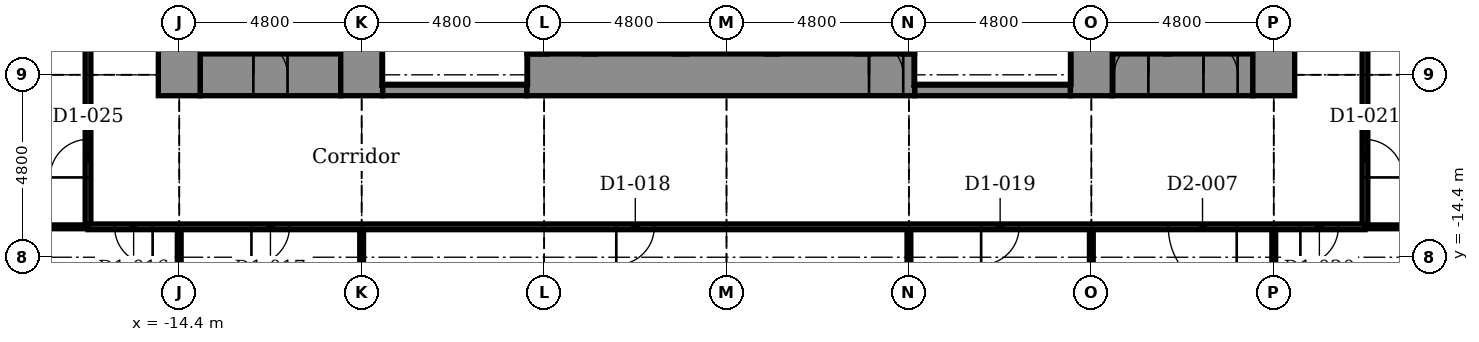
"""IFC4 building model, lengths in metres.
Left out: names, types, materials, properties, quantities, classifications, styles, units other than length and angle.
Written with IfcOpenShell. Run it as: python <this file> out.ifc"""

import sys

from ifc_helpers import new_model, si_unit, direction, frame, frame_2d, origin, place, context, subcontext, project, spatial, rectangle, extrude, element, fill, save


model = new_model("IFC4")
c1 = context("Model", 3, precision=1e-05, world=origin(), true_north=direction((0.0, 1.0)))
c2 = subcontext(c1, "Body", "Model", "MODEL_VIEW")
j1 = project(units=[si_unit("LENGTHUNIT", "METRE"), si_unit("PLANEANGLEUNIT", "RADIAN")], contexts=[c1])
p1 = place(None, origin())
s1 = spatial("IfcSite", under=j1, at=p1, CompositionType="ELEMENT")
p2 = place(p1, origin())
s2 = spatial("IfcBuilding", under=s1, at=p2, CompositionType="ELEMENT")
p3 = place(p2, frame((0.0, 0.0, 7.0)))
s3 = spatial("IfcBuildingStorey", under=s2, at=p3, CompositionType="ELEMENT", Elevation=7.0)
p4 = place(p3, frame((-9.05, -10.0, -0.3), z_axis=(0.0, 0.0, 1.0), x_axis=(1.0, 0.0, 0.0)))
e1 = element("IfcWall", 1, at=p4, inside=s3, PredefinedType="STANDARD", context=c2, shape_type="SweptSolid", body=[
    extrude(rectangle(XDim=3.8, YDim=0.3, at=frame_2d((1.9, 0.0))), origin(), (0.0, 0.0, 1.0), 5.4),
])
p5 = place(p3, frame((4.95, -10.0, -0.3), z_axis=(0.0, 0.0, 1.0), x_axis=(1.0, 0.0, 0.0)))
e2 = element("IfcWall", 2, at=p5, inside=s3, PredefinedType="STANDARD", context=c2, shape_type="SweptSolid", body=[
    extrude(rectangle(XDim=4.1, YDim=0.3, at=frame_2d((2.05, 0.0))), origin(), (0.0, 0.0, 1.0), 5.4),
])
p6 = place(p3, frame((-13.85, -9.6, -0.3), z_axis=(0.0, 0.0, 1.0), x_axis=(1.0, 0.0, 0.0)))
e3 = element("IfcWall", 3, at=p6, inside=s3, PredefinedType="SHEAR", context=c2, shape_type="SweptSolid", body=[
    extrude(rectangle(XDim=3.7, YDim=1.1, at=frame_2d((1.85, 0.0))), origin(), (0.0, 0.0, 1.0), 5.4),
])
p7 = place(p6, frame((1.4, 0.0, 0.3)))
e4 = element("IfcOpeningElement", 4, at=p7, cuts=e3, PredefinedType="OPENING", context=c2, shape_type="SweptSolid", body=[
    extrude(rectangle(XDim=0.9, YDim=2.1, at=frame_2d((0.45, 1.05))), frame((0.0, 0.56, 0.0), z_axis=(0.0, -1.0, 0.0), x_axis=(1.0, 0.0, 0.0)), (0.0, 0.0, 1.0), 1.12),
])
p8 = place(p3, frame((-5.25, -9.6, -0.3), z_axis=(0.0, 0.0, 1.0), x_axis=(1.0, 0.0, 0.0)))
e5 = element("IfcWall", 5, at=p8, inside=s3, PredefinedType="SHEAR", context=c2, shape_type="SweptSolid", body=[
    extrude(rectangle(XDim=10.2, YDim=1.1, at=frame_2d((5.1, 0.0))), origin(), (0.0, 0.0, 1.0), 5.4),
])
p9 = place(p8, frame((9.0, 0.0, 0.3)))
e6 = element("IfcOpeningElement", 6, at=p9, cuts=e5, PredefinedType="OPENING", context=c2, shape_type="SweptSolid", body=[
    extrude(rectangle(XDim=0.9, YDim=2.1, at=frame_2d((0.45, 1.05))), frame((0.0, 0.56, 0.0), z_axis=(0.0, -1.0, 0.0), x_axis=(1.0, 0.0, 0.0)), (0.0, 0.0, 1.0), 1.12),
])
p10 = place(p3, frame((10.15, -9.6, -0.3), z_axis=(0.0, 0.0, 1.0), x_axis=(1.0, 0.0, 0.0)))
e7 = element("IfcWall", 7, at=p10, inside=s3, PredefinedType="SHEAR", context=c2, shape_type="SweptSolid", body=[
    extrude(rectangle(XDim=3.7, YDim=1.1, at=frame_2d((1.85, 0.0))), origin(), (0.0, 0.0, 1.0), 5.4),
])
p11 = place(p10, frame((0.05, 0.0, 0.3)))
e8 = element("IfcOpeningElement", 8, at=p11, cuts=e7, PredefinedType="OPENING", context=c2, shape_type="SweptSolid", body=[
    extrude(rectangle(XDim=0.9, YDim=2.1, at=frame_2d((0.45, 1.05))), frame((0.0, 0.56, 0.0), z_axis=(0.0, -1.0, 0.0), x_axis=(1.0, 0.0, 0.0)), (0.0, 0.0, 1.0), 1.12),
])
p12 = place(p10, frame((2.4, 0.0, 0.3)))
e9 = element("IfcOpeningElement", 9, at=p12, cuts=e7, PredefinedType="OPENING", context=c2, shape_type="SweptSolid", body=[
    extrude(rectangle(XDim=0.9, YDim=2.1, at=frame_2d((0.45, 1.05))), frame((0.0, 0.56, 0.0), z_axis=(0.0, -1.0, 0.0), x_axis=(1.0, 0.0, 0.0)), (0.0, 0.0, 1.0), 1.12),
])
p13 = place(p3, frame((-14.4, -10.15, -0.3), z_axis=(0.0, 0.0, 1.0), x_axis=(0.0, 1.0, 0.0)))
e10 = element("IfcWall", 10, at=p13, inside=s3, PredefinedType="SHEAR", context=c2, shape_type="SweptSolid", body=[
    extrude(rectangle(XDim=20.3, YDim=1.1, at=frame_2d((10.15, 0.0))), origin(), (0.0, 0.0, 1.0), 5.4),
])
p14 = place(p13, frame((3.6, 0.0, 0.3)))
e11 = element("IfcOpeningElement", 11, at=p14, cuts=e10, PredefinedType="OPENING", context=c2, shape_type="SweptSolid", body=[
    extrude(rectangle(XDim=1.1, YDim=2.1, at=frame_2d((0.55, 1.05))), frame((0.0, 0.56, 0.0), z_axis=(0.0, -1.0, 0.0), x_axis=(1.0, 0.0, 0.0)), (0.0, 0.0, 1.0), 1.12),
])
p15 = place(p13, frame((6.0, 0.0, 0.3)))
e12 = element("IfcOpeningElement", 12, at=p15, cuts=e10, PredefinedType="OPENING", context=c2, shape_type="SweptSolid", body=[
    extrude(rectangle(XDim=1.1, YDim=2.1, at=frame_2d((0.55, 1.05))), frame((0.0, 0.56, 0.0), z_axis=(0.0, -1.0, 0.0), x_axis=(1.0, 0.0, 0.0)), (0.0, 0.0, 1.0), 1.12),
])
p16 = place(p13, frame((8.4, 0.0, 0.3)))
e13 = element("IfcOpeningElement", 13, at=p16, cuts=e10, PredefinedType="OPENING", context=c2, shape_type="SweptSolid", body=[
    extrude(rectangle(XDim=1.1, YDim=2.1, at=frame_2d((0.55, 1.05))), frame((0.0, 0.56, 0.0), z_axis=(0.0, -1.0, 0.0), x_axis=(1.0, 0.0, 0.0)), (0.0, 0.0, 1.0), 1.12),
])
p17 = place(p13, frame((10.8, 0.0, 0.3)))
e14 = element("IfcOpeningElement", 14, at=p17, cuts=e10, PredefinedType="OPENING", context=c2, shape_type="SweptSolid", body=[
    extrude(rectangle(XDim=1.1, YDim=2.1, at=frame_2d((0.55, 1.05))), frame((0.0, 0.56, 0.0), z_axis=(0.0, -1.0, 0.0), x_axis=(1.0, 0.0, 0.0)), (0.0, 0.0, 1.0), 1.12),
])
p18 = place(p3, frame((-9.6, -10.15, -0.3), z_axis=(0.0, 0.0, 1.0), x_axis=(0.0, 1.0, 0.0)))
e15 = element("IfcWall", 15, at=p18, inside=s3, PredefinedType="SHEAR", context=c2, shape_type="SweptSolid", body=[
    extrude(rectangle(XDim=7.6, YDim=1.1, at=frame_2d((3.8, 0.0))), origin(), (0.0, 0.0, 1.0), 5.4),
])
p19 = place(p3, frame((-5.1, -9.05, -0.3), z_axis=(0.0, 0.0, 1.0), x_axis=(0.0, 1.0, 0.0)))
e16 = element("IfcWall", 16, at=p19, inside=s3, PredefinedType="STANDARD", context=c2, shape_type="SweptSolid", body=[
    extrude(rectangle(XDim=6.8, YDim=0.3, at=frame_2d((3.4, 0.0))), origin(), (0.0, 0.0, 1.0), 5.4),
])
p20 = place(p19, frame((3.6, 0.0, 0.3)))
e17 = element("IfcOpeningElement", 17, at=p20, cuts=e16, PredefinedType="OPENING", context=c2, shape_type="SweptSolid", body=[
    extrude(rectangle(XDim=1.2, YDim=2.1, at=frame_2d((0.6, 1.05))), frame((0.0, 0.16, 0.0), z_axis=(0.0, -1.0, 0.0), x_axis=(1.0, 0.0, 0.0)), (0.0, 0.0, 1.0), 0.32),
])
for number, where, z_axis, x_axis in (
    (18, (-3.6, -9.05, -0.3), (0.0, 0.0, 1.0), (0.0, 1.0, 0.0)),
    (19, (-1.2, -9.05, -0.3), (0.0, 0.0, 1.0), (0.0, 1.0, 0.0)),
    (20, (1.2, -9.05, -0.3), (0.0, 0.0, 1.0), (0.0, 1.0, 0.0)),
    (21, (3.6, -9.05, -0.3), (0.0, 0.0, 1.0), (0.0, 1.0, 0.0)),
):
    element("IfcWall", number, at=place(p3, frame(where, z_axis=z_axis, x_axis=x_axis)), inside=s3, PredefinedType="STANDARD", context=c2, shape_type="SweptSolid", body=[
        extrude(rectangle(XDim=3.2, YDim=0.3, at=frame_2d((1.6, 0.0))), origin(), (0.0, 0.0, 1.0), 5.4),
    ])
p21 = place(p3, frame((4.8, -9.05, -0.3), z_axis=(0.0, 0.0, 1.0), x_axis=(0.0, 1.0, 0.0)))
e22 = element("IfcWall", 22, at=p21, inside=s3, PredefinedType="STANDARD", context=c2, shape_type="SweptSolid", body=[
    extrude(rectangle(XDim=6.8, YDim=0.3, at=frame_2d((3.4, 0.0))), origin(), (0.0, 0.0, 1.0), 5.4),
])
p22 = place(p21, frame((3.6, 0.0, 0.3)))
e23 = element("IfcOpeningElement", 23, at=p22, cuts=e22, PredefinedType="OPENING", context=c2, shape_type="SweptSolid", body=[
    extrude(rectangle(XDim=1.2, YDim=2.1, at=frame_2d((0.6, 1.05))), frame((0.0, 0.16, 0.0), z_axis=(0.0, -1.0, 0.0), x_axis=(1.0, 0.0, 0.0)), (0.0, 0.0, 1.0), 0.32),
])
p23 = place(p3, frame((9.6, -10.15, -0.3), z_axis=(0.0, 0.0, 1.0), x_axis=(0.0, 1.0, 0.0)))
e24 = element("IfcWall", 24, at=p23, inside=s3, PredefinedType="SHEAR", context=c2, shape_type="SweptSolid", body=[
    extrude(rectangle(XDim=20.3, YDim=1.1, at=frame_2d((10.15, 0.0))), origin(), (0.0, 0.0, 1.0), 5.4),
])
p24 = place(p3, frame((14.4, -10.15, -0.3), z_axis=(0.0, 0.0, 1.0), x_axis=(0.0, 1.0, 0.0)))
e25 = element("IfcWall", 25, at=p24, inside=s3, PredefinedType="SHEAR", context=c2, shape_type="SweptSolid", body=[
    extrude(rectangle(XDim=20.3, YDim=1.1, at=frame_2d((10.15, 0.0))), origin(), (0.0, 0.0, 1.0), 5.4),
])
p25 = place(p24, frame((3.6, 0.0, 0.3)))
e26 = element("IfcOpeningElement", 26, at=p25, cuts=e25, PredefinedType="OPENING", context=c2, shape_type="SweptSolid", body=[
    extrude(rectangle(XDim=1.1, YDim=2.1, at=frame_2d((0.55, 1.05))), frame((0.0, 0.56, 0.0), z_axis=(0.0, -1.0, 0.0), x_axis=(1.0, 0.0, 0.0)), (0.0, 0.0, 1.0), 1.12),
])
p26 = place(p24, frame((6.0, 0.0, 0.3)))
e27 = element("IfcOpeningElement", 27, at=p26, cuts=e25, PredefinedType="OPENING", context=c2, shape_type="SweptSolid", body=[
    extrude(rectangle(XDim=1.1, YDim=2.1, at=frame_2d((0.55, 1.05))), frame((0.0, 0.56, 0.0), z_axis=(0.0, -1.0, 0.0), x_axis=(1.0, 0.0, 0.0)), (0.0, 0.0, 1.0), 1.12),
])
p27 = place(p24, frame((8.4, 0.0, 0.3)))
e28 = element("IfcOpeningElement", 28, at=p27, cuts=e25, PredefinedType="OPENING", context=c2, shape_type="SweptSolid", body=[
    extrude(rectangle(XDim=1.1, YDim=2.1, at=frame_2d((0.55, 1.05))), frame((0.0, 0.56, 0.0), z_axis=(0.0, -1.0, 0.0), x_axis=(1.0, 0.0, 0.0)), (0.0, 0.0, 1.0), 1.12),
])
p28 = place(p24, frame((10.8, 0.0, 0.3)))
e29 = element("IfcOpeningElement", 29, at=p28, cuts=e25, PredefinedType="OPENING", context=c2, shape_type="SweptSolid", body=[
    extrude(rectangle(XDim=1.1, YDim=2.1, at=frame_2d((0.55, 1.05))), frame((0.0, 0.56, 0.0), z_axis=(0.0, -1.0, 0.0), x_axis=(1.0, 0.0, 0.0)), (0.0, 0.0, 1.0), 1.12),
])
p29 = place(p3, frame((16.8, -13.6, 0.0), z_axis=(0.0, 0.0, 1.0), x_axis=(0.0, 1.0, 0.0)))
e30 = element("IfcWall", 30, at=p29, inside=s3, PredefinedType="PARTITIONING", context=c2, shape_type="SweptSolid", body=[
    extrude(rectangle(XDim=9.65, YDim=0.15, at=frame_2d((4.825, 0.0))), origin(), (0.0, 0.0, 1.0), 5.1),
])
p30 = place(p29, frame((1.3, 0.0, 0.0)))
e31 = element("IfcOpeningElement", 31, at=p30, cuts=e30, PredefinedType="OPENING", context=c2, shape_type="SweptSolid", body=[
    extrude(rectangle(XDim=1.0, YDim=2.1, at=frame_2d((0.5, 1.05))), frame((0.0, 0.085, 0.0), z_axis=(0.0, -1.0, 0.0), x_axis=(1.0, 0.0, 0.0)), (0.0, 0.0, 1.0), 0.17),
])
p31 = place(p29, frame((7.7, 0.0, 0.0)))
e32 = element("IfcOpeningElement", 32, at=p31, cuts=e30, PredefinedType="OPENING", context=c2, shape_type="SweptSolid", body=[
    extrude(rectangle(XDim=1.0, YDim=2.1, at=frame_2d((0.5, 1.05))), frame((0.0, 0.085, 0.0), z_axis=(0.0, -1.0, 0.0), x_axis=(1.0, 0.0, 0.0)), (0.0, 0.0, 1.0), 0.17),
])
p32 = place(p3, frame((14.4, -19.126, 0.0), z_axis=(0.0, 0.0, 1.0), x_axis=(0.0, 1.0, 0.0)))
e33 = element("IfcWall", 33, at=p32, inside=s3, PredefinedType="PARTITIONING", context=c2, shape_type="SweptSolid", body=[
    extrude(rectangle(XDim=5.526, YDim=0.1, at=frame_2d((2.763, 0.0))), origin(), (0.0, 0.0, 1.0), 4.693),
])
p33 = place(p3, frame((11.6, -9.05, 0.0), z_axis=(0.0, 0.0, 1.0), x_axis=(0.0, 1.0, 0.0)))
e34 = element("IfcWall", 34, at=p33, inside=s3, PredefinedType="PARTITIONING", context=c2, shape_type="SweptSolid", body=[
    extrude(rectangle(XDim=1.7, YDim=0.1, at=frame_2d((0.85, 0.0))), origin(), (0.0, 0.0, 1.0), 5.1),
])
p34 = place(p3, frame((9.6, -18.64, 0.0), z_axis=(0.0, 0.0, 1.0), x_axis=(0.0, 1.0, 0.0)))
e35 = element("IfcWall", 35, at=p34, inside=s3, PredefinedType="PARTITIONING", context=c2, shape_type="SweptSolid", body=[
    extrude(rectangle(XDim=5.04, YDim=0.1, at=frame_2d((2.52, 0.0))), origin(), (0.0, 0.0, 1.0), 4.693),
])
p35 = place(p3, frame((4.8, -19.126, 0.0), z_axis=(0.0, 0.0, 1.0), x_axis=(0.0, 1.0, 0.0)))
e36 = element("IfcWall", 36, at=p35, inside=s3, PredefinedType="PARTITIONING", context=c2, shape_type="SweptSolid", body=[
    extrude(rectangle(XDim=5.526, YDim=0.1, at=frame_2d((2.763, 0.0))), origin(), (0.0, 0.0, 1.0), 4.693),
])
p36 = place(p3, frame((-4.8, -9.05, 0.0), z_axis=(0.0, 0.0, 1.0), x_axis=(0.0, 1.0, 0.0)))
e37 = element("IfcWall", 37, at=p36, inside=s3, PredefinedType="PARTITIONING", context=c2, shape_type="SweptSolid", body=[
    extrude(rectangle(XDim=3.05, YDim=0.15, at=frame_2d((1.525, 0.0))), origin(), (0.0, 0.0, 1.0), 5.1),
])
p37 = place(p3, frame((-9.6, -18.64, 0.0), z_axis=(0.0, 0.0, 1.0), x_axis=(0.0, 1.0, 0.0)))
e38 = element("IfcWall", 38, at=p37, inside=s3, PredefinedType="PARTITIONING", context=c2, shape_type="SweptSolid", body=[
    extrude(rectangle(XDim=5.04, YDim=0.1, at=frame_2d((2.52, 0.0))), origin(), (0.0, 0.0, 1.0), 4.693),
])
p38 = place(p3, frame((-14.4, -19.126, 0.0), z_axis=(0.0, 0.0, 1.0), x_axis=(0.0, 1.0, 0.0)))
e39 = element("IfcWall", 39, at=p38, inside=s3, PredefinedType="PARTITIONING", context=c2, shape_type="SweptSolid", body=[
    extrude(rectangle(XDim=5.526, YDim=0.1, at=frame_2d((2.763, 0.0))), origin(), (0.0, 0.0, 1.0), 4.693),
])
p39 = place(p3, frame((-16.8, -13.6, 0.0), z_axis=(0.0, 0.0, 1.0), x_axis=(0.0, 1.0, 0.0)))
e40 = element("IfcWall", 40, at=p39, inside=s3, PredefinedType="PARTITIONING", context=c2, shape_type="SweptSolid", body=[
    extrude(rectangle(XDim=9.65, YDim=0.15, at=frame_2d((4.825, 0.0))), origin(), (0.0, 0.0, 1.0), 5.1),
])
p40 = place(p39, frame((1.3, 0.0, 0.0)))
e41 = element("IfcOpeningElement", 41, at=p40, cuts=e40, PredefinedType="OPENING", context=c2, shape_type="SweptSolid", body=[
    extrude(rectangle(XDim=1.0, YDim=2.1, at=frame_2d((0.5, 1.05))), frame((0.0, 0.085, 0.0), z_axis=(0.0, -1.0, 0.0), x_axis=(1.0, 0.0, 0.0)), (0.0, 0.0, 1.0), 0.17),
])
p41 = place(p39, frame((7.7, 0.0, 0.0)))
e42 = element("IfcOpeningElement", 42, at=p41, cuts=e40, PredefinedType="OPENING", context=c2, shape_type="SweptSolid", body=[
    extrude(rectangle(XDim=1.0, YDim=2.1, at=frame_2d((0.5, 1.05))), frame((0.0, 0.085, 0.0), z_axis=(0.0, -1.0, 0.0), x_axis=(1.0, 0.0, 0.0)), (0.0, 0.0, 1.0), 0.17),
])
for number, where, z_axis, x_axis in (
    (43, (-19.2, -13.6, 0.0), (0.0, 0.0, 1.0), (1.0, 0.0, 0.0)),
    (44, (16.8, -13.6, 0.0), (0.0, 0.0, 1.0), (1.0, 0.0, 0.0)),
):
    element("IfcWall", number, at=place(p3, frame(where, z_axis=z_axis, x_axis=x_axis)), inside=s3, PredefinedType="PARTITIONING", context=c2, shape_type="SweptSolid", body=[
        extrude(rectangle(XDim=2.4, YDim=0.1, at=frame_2d((1.2, 0.0))), origin(), (0.0, 0.0, 1.0), 5.1),
    ])
p42 = place(p3, frame((-16.8, -13.6, 0.0), z_axis=(0.0, 0.0, 1.0), x_axis=(1.0, 0.0, 0.0)))
e45 = element("IfcWall", 45, at=p42, inside=s3, PredefinedType="PARTITIONING", context=c2, shape_type="SweptSolid", body=[
    extrude(rectangle(XDim=33.6, YDim=0.15, at=frame_2d((16.8, 0.0))), origin(), (0.0, 0.0, 1.0), 5.1),
])
p43 = place(p42, frame((0.7, 0.0, 0.0)))
e46 = element("IfcOpeningElement", 46, at=p43, cuts=e45, PredefinedType="OPENING", context=c2, shape_type="SweptSolid", body=[
    extrude(rectangle(XDim=1.0, YDim=2.1, at=frame_2d((0.5, 1.05))), frame((0.0, 0.085, 0.0), z_axis=(0.0, -1.0, 0.0), x_axis=(1.0, 0.0, 0.0)), (0.0, 0.0, 1.0), 0.17),
])
p44 = place(p42, frame((4.3, 0.0, 0.0)))
e47 = element("IfcOpeningElement", 47, at=p44, cuts=e45, PredefinedType="OPENING", context=c2, shape_type="SweptSolid", body=[
    extrude(rectangle(XDim=1.0, YDim=2.1, at=frame_2d((0.5, 1.05))), frame((0.0, 0.085, 0.0), z_axis=(0.0, -1.0, 0.0), x_axis=(1.0, 0.0, 0.0)), (0.0, 0.0, 1.0), 0.17),
])
p45 = place(p42, frame((13.9, 0.0, 0.0)))
e48 = element("IfcOpeningElement", 48, at=p45, cuts=e45, PredefinedType="OPENING", context=c2, shape_type="SweptSolid", body=[
    extrude(rectangle(XDim=1.0, YDim=2.1, at=frame_2d((0.5, 1.05))), frame((0.0, 0.085, 0.0), z_axis=(0.0, -1.0, 0.0), x_axis=(1.0, 0.0, 0.0)), (0.0, 0.0, 1.0), 0.17),
])
p46 = place(p42, frame((23.5, 0.0, 0.0)))
e49 = element("IfcOpeningElement", 49, at=p46, cuts=e45, PredefinedType="OPENING", context=c2, shape_type="SweptSolid", body=[
    extrude(rectangle(XDim=1.0, YDim=2.1, at=frame_2d((0.5, 1.05))), frame((0.0, 0.085, 0.0), z_axis=(0.0, -1.0, 0.0), x_axis=(1.0, 0.0, 0.0)), (0.0, 0.0, 1.0), 0.17),
])
p47 = place(p42, frame((28.425, 0.0, 0.0)))
e50 = element("IfcOpeningElement", 50, at=p47, cuts=e45, PredefinedType="OPENING", context=c2, shape_type="SweptSolid", body=[
    extrude(rectangle(XDim=1.8, YDim=2.1, at=frame_2d((0.9, 1.05))), frame((0.0, 0.085, 0.0), z_axis=(0.0, -1.0, 0.0), x_axis=(1.0, 0.0, 0.0)), (0.0, 0.0, 1.0), 0.17),
])
p48 = place(p42, frame((31.9, 0.0, 0.0)))
e51 = element("IfcOpeningElement", 51, at=p48, cuts=e45, PredefinedType="OPENING", context=c2, shape_type="SweptSolid", body=[
    extrude(rectangle(XDim=1.0, YDim=2.1, at=frame_2d((0.5, 1.05))), frame((0.0, 0.085, 0.0), z_axis=(0.0, -1.0, 0.0), x_axis=(1.0, 0.0, 0.0)), (0.0, 0.0, 1.0), 0.17),
])
p49 = place(p43, frame((1.0, 0.0, 0.0), z_axis=(0.0, 0.0, 1.0), x_axis=(-1.0, 0.0, 0.0)))
e52 = element("IfcDoor", 52, at=p49, inside=s3, OperationType="SINGLE_SWING_RIGHT", PredefinedType="DOOR", context=c2, shape_type="SweptSolid", body=[
    extrude(rectangle(XDim=1.0, YDim=2.1, at=frame_2d((0.5, 1.05))), frame((0.0, 0.025, 0.0), z_axis=(0.0, -1.0, 0.0), x_axis=(1.0, 0.0, 0.0)), (0.0, 0.0, 1.0), 0.05),
])
fill(e46, e52)
p50 = place(p44, frame((1.0, 0.0, 0.0), z_axis=(0.0, 0.0, 1.0), x_axis=(-1.0, 0.0, 0.0)))
e53 = element("IfcDoor", 53, at=p50, inside=s3, OperationType="SINGLE_SWING_LEFT", PredefinedType="DOOR", context=c2, shape_type="SweptSolid", body=[
    extrude(rectangle(XDim=1.0, YDim=2.1, at=frame_2d((0.5, 1.05))), frame((0.0, 0.025, 0.0), z_axis=(0.0, -1.0, 0.0), x_axis=(1.0, 0.0, 0.0)), (0.0, 0.0, 1.0), 0.05),
])
fill(e47, e53)
p51 = place(p45, frame((1.0, 0.0, 0.0), z_axis=(0.0, 0.0, 1.0), x_axis=(-1.0, 0.0, 0.0)))
e54 = element("IfcDoor", 54, at=p51, inside=s3, OperationType="SINGLE_SWING_LEFT", PredefinedType="DOOR", context=c2, shape_type="SweptSolid", body=[
    extrude(rectangle(XDim=1.0, YDim=2.1, at=frame_2d((0.5, 1.05))), frame((0.0, 0.025, 0.0), z_axis=(0.0, -1.0, 0.0), x_axis=(1.0, 0.0, 0.0)), (0.0, 0.0, 1.0), 0.05),
])
fill(e48, e54)
p52 = place(p46, frame((1.0, 0.0, 0.0), z_axis=(0.0, 0.0, 1.0), x_axis=(-1.0, 0.0, 0.0)))
e55 = element("IfcDoor", 55, at=p52, inside=s3, OperationType="SINGLE_SWING_LEFT", PredefinedType="DOOR", context=c2, shape_type="SweptSolid", body=[
    extrude(rectangle(XDim=1.0, YDim=2.1, at=frame_2d((0.5, 1.05))), frame((0.0, 0.025, 0.0), z_axis=(0.0, -1.0, 0.0), x_axis=(1.0, 0.0, 0.0)), (0.0, 0.0, 1.0), 0.05),
])
fill(e49, e55)
p53 = place(p47, frame((1.8, 0.0, 0.0), z_axis=(0.0, 0.0, 1.0), x_axis=(-1.0, 0.0, 0.0)))
e56 = element("IfcDoor", 56, at=p53, inside=s3, OperationType="SINGLE_SWING_RIGHT", PredefinedType="DOOR", context=c2, shape_type="SweptSolid", body=[
    extrude(rectangle(XDim=1.8, YDim=2.1, at=frame_2d((0.9, 1.05))), frame((0.0, 0.025, 0.0), z_axis=(0.0, -1.0, 0.0), x_axis=(1.0, 0.0, 0.0)), (0.0, 0.0, 1.0), 0.05),
])
fill(e50, e56)
p54 = place(p48, frame((1.0, 0.0, 0.0), z_axis=(0.0, 0.0, 1.0), x_axis=(-1.0, 0.0, 0.0)))
e57 = element("IfcDoor", 57, at=p54, inside=s3, OperationType="SINGLE_SWING_LEFT", PredefinedType="DOOR", context=c2, shape_type="SweptSolid", body=[
    extrude(rectangle(XDim=1.0, YDim=2.1, at=frame_2d((0.5, 1.05))), frame((0.0, 0.025, 0.0), z_axis=(0.0, -1.0, 0.0), x_axis=(1.0, 0.0, 0.0)), (0.0, 0.0, 1.0), 0.05),
])
fill(e51, e57)
p55 = place(p30, frame((1.0, 0.0, 0.0), z_axis=(0.0, 0.0, 1.0), x_axis=(-1.0, 0.0, 0.0)))
e58 = element("IfcDoor", 58, at=p55, inside=s3, OperationType="SINGLE_SWING_LEFT", PredefinedType="DOOR", context=c2, shape_type="SweptSolid", body=[
    extrude(rectangle(XDim=1.0, YDim=2.1, at=frame_2d((0.5, 1.05))), frame((0.0, 0.025, 0.0), z_axis=(0.0, -1.0, 0.0), x_axis=(1.0, 0.0, 0.0)), (0.0, 0.0, 1.0), 0.05),
])
fill(e31, e58)
p56 = place(p40, origin())
e59 = element("IfcDoor", 59, at=p56, inside=s3, OperationType="SINGLE_SWING_LEFT", PredefinedType="DOOR", context=c2, shape_type="SweptSolid", body=[
    extrude(rectangle(XDim=1.0, YDim=2.1, at=frame_2d((0.5, 1.05))), frame((0.0, 0.025, 0.0), z_axis=(0.0, -1.0, 0.0), x_axis=(1.0, 0.0, 0.0)), (0.0, 0.0, 1.0), 0.05),
])
fill(e41, e59)
p57 = place(p11, origin())
e60 = element("IfcDoor", 60, at=p57, inside=s3, OperationType="SINGLE_SWING_RIGHT", PredefinedType="DOOR", context=c2, shape_type="SweptSolid", body=[
    extrude(rectangle(XDim=0.9, YDim=2.1, at=frame_2d((0.45, 1.05))), frame((0.0, 0.025, 0.0), z_axis=(0.0, -1.0, 0.0), x_axis=(1.0, 0.0, 0.0)), (0.0, 0.0, 1.0), 0.05),
])
fill(e8, e60)
p58 = place(p12, origin())
e61 = element("IfcDoor", 61, at=p58, inside=s3, OperationType="SINGLE_SWING_LEFT", PredefinedType="DOOR", context=c2, shape_type="SweptSolid", body=[
    extrude(rectangle(XDim=0.9, YDim=2.1, at=frame_2d((0.45, 1.05))), frame((0.0, 0.025, 0.0), z_axis=(0.0, -1.0, 0.0), x_axis=(1.0, 0.0, 0.0)), (0.0, 0.0, 1.0), 0.05),
])
fill(e9, e61)
p59 = place(p7, origin())
e62 = element("IfcDoor", 62, at=p59, inside=s3, OperationType="SINGLE_SWING_LEFT", PredefinedType="DOOR", context=c2, shape_type="SweptSolid", body=[
    extrude(rectangle(XDim=0.9, YDim=2.1, at=frame_2d((0.45, 1.05))), frame((0.0, 0.025, 0.0), z_axis=(0.0, -1.0, 0.0), x_axis=(1.0, 0.0, 0.0)), (0.0, 0.0, 1.0), 0.05),
])
fill(e4, e62)
p60 = place(p9, origin())
e63 = element("IfcDoor", 63, at=p60, inside=s3, OperationType="SINGLE_SWING_LEFT", PredefinedType="DOOR", context=c2, shape_type="SweptSolid", body=[
    extrude(rectangle(XDim=0.9, YDim=2.1, at=frame_2d((0.45, 1.05))), frame((0.0, 0.025, 0.0), z_axis=(0.0, -1.0, 0.0), x_axis=(1.0, 0.0, 0.0)), (0.0, 0.0, 1.0), 0.05),
])
fill(e6, e63)
save(model, sys.argv[1])
